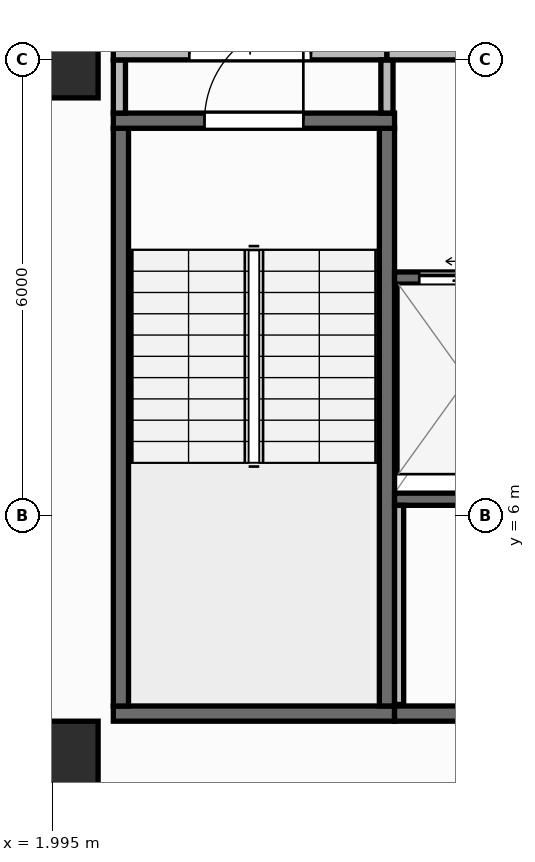
"""IFC4 building model, lengths in metres.
Left out: names, types, materials, properties, quantities, classifications, styles, units other than length and angle.
Written with IfcOpenShell. Run it as: python <this file> out.ifc"""

import sys

from ifc_helpers import new_model, si_unit, direction, frame, frame_2d, origin, origin_2d, place, context, subcontext, project, spatial, rectangle, extrude, element, fill, save


model = new_model("IFC4")
c1 = context("Model", 3, precision=1e-05, world=origin(), true_north=direction((0.0, 1.0)))
c2 = subcontext(c1, "Body", "Model", "MODEL_VIEW")
j1 = project(units=[si_unit("LENGTHUNIT", "METRE"), si_unit("PLANEANGLEUNIT", "RADIAN")], contexts=[c1])
p1 = place(None, origin())
s1 = spatial("IfcSite", under=j1, at=p1, CompositionType="ELEMENT")
p2 = place(p1, origin())
s2 = spatial("IfcBuilding", under=s1, at=p2, CompositionType="ELEMENT")
p3 = place(p2, frame((0.0, 0.0, 196.05)))
s3 = spatial("IfcBuildingStorey", under=s2, at=p3, CompositionType="ELEMENT", Elevation=196.05)
for number, where, z_axis, x_axis in (
    (1, (2.1, 2.8, 0.0), (0.0, 0.0, 1.0), (1.0, 0.0, 0.0)),
    (2, (2.1, 12.0, 0.0), (0.0, 0.0, 1.0), (1.0, 0.0, 0.0)),
):
    element("IfcColumn", number, at=place(p3, frame(where, z_axis=z_axis, x_axis=x_axis)), inside=s3, PredefinedType="COLUMN", context=c2, shape_type="SweptSolid", body=[
        extrude(rectangle(XDim=1.0, YDim=1.0, at=origin_2d()), origin(), (0.0, 0.0, 1.0), 3.95),
    ])
p4 = place(p3, frame((2.66, 0.174, 0.0), z_axis=(0.0, 0.0, 1.0), x_axis=(0.996634028439, 0.081979347142, 0.0)))
e3 = element("IfcWall", 3, at=p4, inside=s3, PredefinedType="STANDARD", context=c2, shape_type="SweptSolid", body=[
    extrude(rectangle(XDim=46.035, YDim=0.26, at=frame_2d((23.018, 0.0))), origin(), (0.0, 0.0, 1.0), 3.71),
])
p5 = place(p4, frame((21.817, 0.0, 0.9)))
e4 = element("IfcOpeningElement", 4, at=p5, cuts=e3, PredefinedType="OPENING", context=c2, shape_type="SweptSolid", body=[
    extrude(rectangle(XDim=2.4, YDim=1.65, at=frame_2d((1.2, 0.825))), frame((0.0, 0.14, 0.0), z_axis=(0.0, -1.0, 0.0), x_axis=(1.0, 0.0, 0.0)), (0.0, 0.0, 1.0), 0.28),
])
p6 = place(p3, frame((2.8, 3.4, 0.0), z_axis=(0.0, 0.0, 1.0), x_axis=(1.0, 0.0, 0.0)))
e5 = element("IfcWall", 5, at=p6, inside=s3, PredefinedType="SHEAR", context=c2, shape_type="SweptSolid", body=[
    extrude(rectangle(XDim=3.7, YDim=0.2, at=frame_2d((1.85, 0.0))), origin(), (0.0, 0.0, 1.0), 3.71),
])
for number, where, z_axis, x_axis in (
    (6, (2.9, 3.5, 0.0), (0.0, 0.0, 1.0), (0.0, 1.0, 0.0)),
    (7, (6.4, 3.5, 0.0), (0.0, 0.0, 1.0), (0.0, 1.0, 0.0)),
):
    element("IfcWall", number, at=place(p3, frame(where, z_axis=z_axis, x_axis=x_axis)), inside=s3, PredefinedType="SHEAR", context=c2, shape_type="SweptSolid", body=[
        extrude(rectangle(XDim=7.6, YDim=0.2, at=frame_2d((3.8, 0.0))), origin(), (0.0, 0.0, 1.0), 3.71),
    ])
p7 = place(p3, frame((2.8, 11.2, 0.0), z_axis=(0.0, 0.0, 1.0), x_axis=(1.0, 0.0, 0.0)))
e8 = element("IfcWall", 8, at=p7, inside=s3, PredefinedType="SHEAR", context=c2, shape_type="SweptSolid", body=[
    extrude(rectangle(XDim=3.7, YDim=0.2, at=frame_2d((1.85, 0.0))), origin(), (0.0, 0.0, 1.0), 3.71),
])
p8 = place(p7, frame((1.2, 0.0, 0.0)))
e9 = element("IfcOpeningElement", 9, at=p8, cuts=e8, PredefinedType="OPENING", context=c2, shape_type="SweptSolid", body=[
    extrude(rectangle(XDim=1.3, YDim=2.15, at=frame_2d((0.65, 1.075))), frame((0.0, 0.11, 0.0), z_axis=(0.0, -1.0, 0.0), x_axis=(1.0, 0.0, 0.0)), (0.0, 0.0, 1.0), 0.22),
])
p9 = place(p3, frame((6.5, 3.4, 0.0), z_axis=(0.0, 0.0, 1.0), x_axis=(1.0, 0.0, 0.0)))
e10 = element("IfcWall", 10, at=p9, inside=s3, PredefinedType="SHEAR", context=c2, shape_type="SweptSolid", body=[
    extrude(rectangle(XDim=13.7, YDim=0.2, at=frame_2d((6.85, 0.0))), origin(), (0.0, 0.0, 1.0), 3.71),
])
p10 = place(p3, frame((6.5, 6.22, 0.0), z_axis=(0.0, 0.0, 1.0), x_axis=(1.0, 0.0, 0.0)))
e11 = element("IfcWall", 11, at=p10, inside=s3, PredefinedType="SHEAR", context=c2, shape_type="SweptSolid", body=[
    extrude(rectangle(XDim=12.11, YDim=0.16, at=frame_2d((6.055, 0.0))), origin(), (0.0, 0.0, 1.0), 3.71),
])
p11 = place(p3, frame((6.5, 9.13, 0.0), z_axis=(0.0, 0.0, 1.0), x_axis=(1.0, 0.0, 0.0)))
e12 = element("IfcWall", 12, at=p11, inside=s3, PredefinedType="SHEAR", context=c2, shape_type="SweptSolid", body=[
    extrude(rectangle(XDim=1.975, YDim=0.16, at=frame_2d((0.988, 0.0))), origin(), (0.0, 0.0, 1.0), 3.71),
])
p12 = place(p11, frame((0.325, 0.0, 0.0)))
e13 = element("IfcOpeningElement", 13, at=p12, cuts=e12, PredefinedType="OPENING", context=c2, shape_type="SweptSolid", body=[
    extrude(rectangle(XDim=1.25, YDim=2.15, at=frame_2d((0.625, 1.075))), frame((0.0, 0.09, 0.0), z_axis=(0.0, -1.0, 0.0), x_axis=(1.0, 0.0, 0.0)), (0.0, 0.0, 1.0), 0.18),
])
p13 = place(p3, frame((6.56, 3.52, 0.0), z_axis=(0.0, 0.0, 1.0), x_axis=(0.0, 1.0, 0.0)))
e14 = element("IfcWall", 14, at=p13, inside=s3, PredefinedType="PARTITIONING", context=c2, shape_type="SweptSolid", body=[
    extrude(rectangle(XDim=2.62, YDim=0.12, at=frame_2d((1.31, 0.0))), origin(), (0.0, 0.0, 1.0), 3.71),
])
p14 = place(p3, frame((2.88, 11.3, 0.0), z_axis=(0.0, 0.0, 1.0), x_axis=(0.0, 1.0, 0.0)))
e15 = element("IfcWall", 15, at=p14, inside=s3, PredefinedType="PARTITIONING", context=c2, shape_type="SweptSolid", body=[
    extrude(rectangle(XDim=0.7, YDim=0.16, at=frame_2d((0.35, 0.0))), origin(), (0.0, 0.0, 1.0), 3.71),
])
p15 = place(p3, frame((2.8, 12.08, 0.0), z_axis=(0.0, 0.0, 1.0), x_axis=(1.0, 0.0, 0.0)))
e16 = element("IfcWall", 16, at=p15, inside=s3, PredefinedType="PARTITIONING", context=c2, shape_type="SweptSolid", body=[
    extrude(rectangle(XDim=3.6, YDim=0.16, at=frame_2d((1.8, 0.0))), origin(), (0.0, 0.0, 1.0), 3.152),
])
p16 = place(p15, frame((1.0, 0.0, 0.0)))
e17 = element("IfcOpeningElement", 17, at=p16, cuts=e16, PredefinedType="OPENING", context=c2, shape_type="SweptSolid", body=[
    extrude(rectangle(XDim=1.6, YDim=2.05, at=frame_2d((0.8, 1.025))), frame((0.0, 0.09, 0.0), z_axis=(0.0, -1.0, 0.0), x_axis=(1.0, 0.0, 0.0)), (0.0, 0.0, 1.0), 0.18),
])
p17 = place(p3, frame((6.4, 11.3, 0.0), z_axis=(0.0, 0.0, 1.0), x_axis=(0.0, 1.0, 0.0)))
e18 = element("IfcWall", 18, at=p17, inside=s3, PredefinedType="PARTITIONING", context=c2, shape_type="SweptSolid", body=[
    extrude(rectangle(XDim=0.7, YDim=0.16, at=frame_2d((0.35, 0.0))), origin(), (0.0, 0.0, 1.0), 3.71),
])
p18 = place(p3, frame((6.4, 12.08, 0.0), z_axis=(0.0, 0.0, 1.0), x_axis=(1.0, 0.0, 0.0)))
e19 = element("IfcWall", 19, at=p18, inside=s3, PredefinedType="PARTITIONING", context=c2, shape_type="SweptSolid", body=[
    extrude(rectangle(XDim=6.18, YDim=0.16, at=frame_2d((3.09, 0.0))), origin(), (0.0, 0.0, 1.0), 3.152),
])
p19 = place(p18, frame((2.29, 0.0, 0.0)))
e20 = element("IfcOpeningElement", 20, at=p19, cuts=e19, PredefinedType="OPENING", context=c2, shape_type="SweptSolid", body=[
    extrude(rectangle(XDim=1.6, YDim=2.05, at=frame_2d((0.8, 1.025))), frame((0.0, 0.09, 0.0), z_axis=(0.0, -1.0, 0.0), x_axis=(1.0, 0.0, 0.0)), (0.0, 0.0, 1.0), 0.18),
])
p20 = place(p8, origin())
e21 = element("IfcDoor", 21, at=p20, inside=s3, OperationType="SINGLE_SWING_RIGHT", PredefinedType="DOOR", context=c2, shape_type="SweptSolid", body=[
    extrude(rectangle(XDim=1.3, YDim=2.15, at=frame_2d((0.65, 1.075))), frame((0.0, 0.025, 0.0), z_axis=(0.0, -1.0, 0.0), x_axis=(1.0, 0.0, 0.0)), (0.0, 0.0, 1.0), 0.05),
])
fill(e9, e21)
p21 = place(p12, origin())
e22 = element("IfcDoor", 22, at=p21, inside=s3, OperationType="SLIDING_TO_LEFT", PredefinedType="DOOR", context=c2, shape_type="SweptSolid", body=[
    extrude(rectangle(XDim=1.25, YDim=2.15, at=frame_2d((0.625, 1.075))), frame((0.0, 0.025, 0.0), z_axis=(0.0, -1.0, 0.0), x_axis=(1.0, 0.0, 0.0)), (0.0, 0.0, 1.0), 0.05),
])
fill(e13, e22)
p22 = place(p16, origin())
e23 = element("IfcDoor", 23, at=p22, inside=s3, OperationType="DOUBLE_DOOR_SINGLE_SWING", PredefinedType="DOOR", context=c2, shape_type="SweptSolid", body=[
    extrude(rectangle(XDim=1.6, YDim=2.05, at=frame_2d((0.8, 1.025))), frame((0.0, 0.025, 0.0), z_axis=(0.0, -1.0, 0.0), x_axis=(1.0, 0.0, 0.0)), (0.0, 0.0, 1.0), 0.05),
])
fill(e17, e23)
save(model, sys.argv[1])
